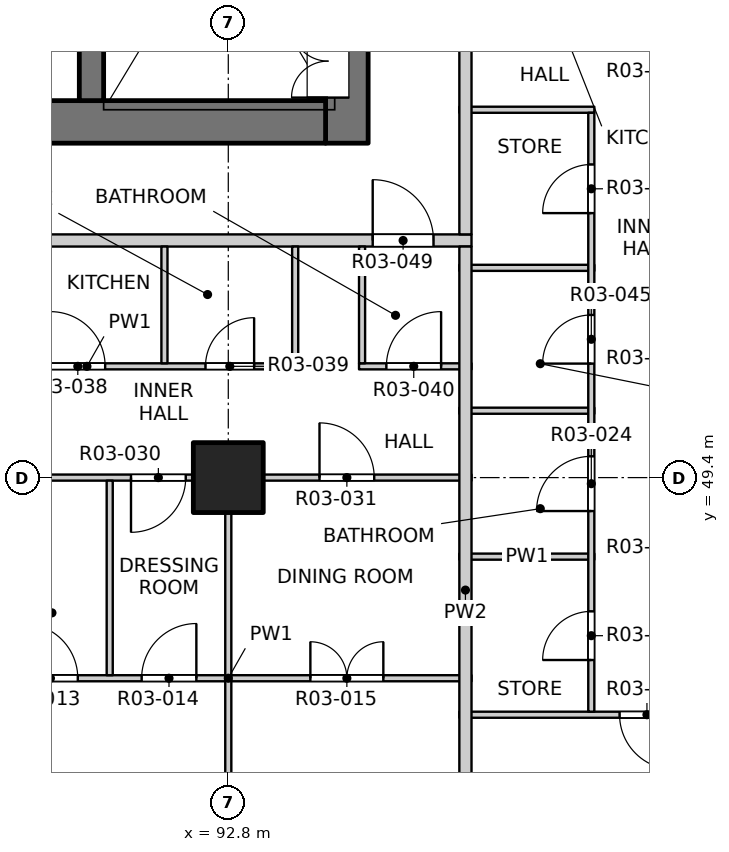
"""IFC4 building model, lengths in metres.
Left out: names, types, materials, properties, quantities, classifications, styles, units other than length and angle.
Written with IfcOpenShell. Run it as: python <this file> out.ifc"""

import sys

from ifc_helpers import new_model, si_unit, direction, frame, frame_2d, origin, origin_2d, place, context, subcontext, project, spatial, rectangle, extrude, element, fill, save


model = new_model("IFC4")
c1 = context("Model", 3, precision=1e-05, world=origin(), true_north=direction((0.0, 1.0)))
c2 = subcontext(c1, "Body", "Model", "MODEL_VIEW")
j1 = project(units=[si_unit("LENGTHUNIT", "METRE"), si_unit("PLANEANGLEUNIT", "RADIAN")], contexts=[c1])
p1 = place(None, origin())
s1 = spatial("IfcSite", under=j1, at=p1, CompositionType="ELEMENT")
p2 = place(p1, origin())
s2 = spatial("IfcBuilding", under=s1, at=p2, CompositionType="ELEMENT")
p3 = place(p2, frame((0.0, 0.0, 39.9)))
s3 = spatial("IfcBuildingStorey", under=s2, at=p3, CompositionType="ELEMENT", Elevation=39.9)
p4 = place(p3, frame((92.8, 49.4, -0.25), z_axis=(0.0, 0.0, 1.0), x_axis=(1.0, 0.0, 0.0)))
e1 = element("IfcColumn", 1, at=p4, inside=s3, PredefinedType="COLUMN", context=c2, shape_type="SweptSolid", body=[
    extrude(rectangle(XDim=1.15, YDim=1.15, at=origin_2d()), origin(), (0.0, 0.0, 1.0), 3.4),
])
p5 = place(p3, frame((94.75, 54.9, -0.25), z_axis=(0.0, 0.0, 1.0), x_axis=(0.0, 1.0, 0.0)))
e2 = element("IfcWall", 2, at=p5, inside=s3, PredefinedType="SOLIDWALL", context=c2, shape_type="SweptSolid", body=[
    extrude(rectangle(XDim=7.05, YDim=0.7, at=frame_2d((3.525, 0.0))), origin(), (0.0, 0.0, 1.0), 3.4),
])
p6 = place(p5, frame((0.75, 0.0, 0.25)))
e3 = element("IfcOpeningElement", 3, at=p6, cuts=e2, PredefinedType="OPENING", context=c2, shape_type="SweptSolid", body=[
    extrude(rectangle(XDim=1.2, YDim=2.1, at=frame_2d((0.6, 1.05))), frame((0.0, 0.36, 0.0), z_axis=(0.0, -1.0, 0.0), x_axis=(1.0, 0.0, 0.0)), (0.0, 0.0, 1.0), 0.72),
])
p7 = place(p3, frame((75.6, 55.25, -0.25), z_axis=(0.0, 0.0, 1.0), x_axis=(1.0, 0.0, 0.0)))
e4 = element("IfcWall", 4, at=p7, inside=s3, PredefinedType="SOLIDWALL", context=c2, shape_type="SweptSolid", body=[
    extrude(rectangle(XDim=18.8, YDim=0.7, at=frame_2d((9.4, 0.0))), origin(), (0.0, 0.0, 1.0), 3.4),
])
p8 = place(p7, frame((8.65, 0.0, 0.25)))
e5 = element("IfcOpeningElement", 5, at=p8, cuts=e4, PredefinedType="OPENING", context=c2, shape_type="SweptSolid", body=[
    extrude(rectangle(XDim=1.5, YDim=2.1, at=frame_2d((0.75, 1.05))), frame((0.0, 0.36, 0.0), z_axis=(0.0, -1.0, 0.0), x_axis=(1.0, 0.0, 0.0)), (0.0, 0.0, 1.0), 0.72),
])
p9 = place(p3, frame((90.55, 55.6, -0.25), z_axis=(0.0, 0.0, 1.0), x_axis=(0.0, 1.0, 0.0)))
e6 = element("IfcWall", 6, at=p9, inside=s3, PredefinedType="SOLIDWALL", context=c2, shape_type="SweptSolid", body=[
    extrude(rectangle(XDim=6.35, YDim=0.4, at=frame_2d((3.175, 0.0))), origin(), (0.0, 0.0, 1.0), 3.4),
])
p10 = place(p3, frame((96.6, 45.5, 0.0), z_axis=(0.0, 0.0, 1.0), x_axis=(1.0, 0.0, 0.0)))
e7 = element("IfcWall", 7, at=p10, inside=s3, PredefinedType="PARTITIONING", context=c2, shape_type="SweptSolid", body=[
    extrude(rectangle(XDim=11.5, YDim=0.1, at=frame_2d((5.75, 0.0))), origin(), (0.0, 0.0, 1.0), 3.15),
])
p11 = place(p10, frame((2.635, 0.0, 0.0)))
e8 = element("IfcOpeningElement", 8, at=p11, cuts=e7, PredefinedType="OPENING", context=c2, shape_type="SweptSolid", body=[
    extrude(rectangle(XDim=0.9, YDim=2.1, at=frame_2d((0.45, 1.05))), frame((0.0, 0.06, 0.0), z_axis=(0.0, -1.0, 0.0), x_axis=(1.0, 0.0, 0.0)), (0.0, 0.0, 1.0), 0.12),
])
p12 = place(p3, frame((88.8, 46.1, 0.0), z_axis=(0.0, 0.0, 1.0), x_axis=(1.0, 0.0, 0.0)))
e9 = element("IfcWall", 9, at=p12, inside=s3, PredefinedType="PARTITIONING", context=c2, shape_type="SweptSolid", body=[
    extrude(rectangle(XDim=8.0, YDim=0.1, at=frame_2d((4.0, 0.0))), origin(), (0.0, 0.0, 1.0), 3.15),
])
p13 = place(p12, frame((0.625, 0.0, 0.0)))
e10 = element("IfcOpeningElement", 10, at=p13, cuts=e9, PredefinedType="OPENING", context=c2, shape_type="SweptSolid", body=[
    extrude(rectangle(XDim=0.9, YDim=2.1, at=frame_2d((0.45, 1.05))), frame((0.0, 0.06, 0.0), z_axis=(0.0, -1.0, 0.0), x_axis=(1.0, 0.0, 0.0)), (0.0, 0.0, 1.0), 0.12),
])
p14 = place(p12, frame((2.575, 0.0, 0.0)))
e11 = element("IfcOpeningElement", 11, at=p14, cuts=e9, PredefinedType="OPENING", context=c2, shape_type="SweptSolid", body=[
    extrude(rectangle(XDim=0.9, YDim=2.1, at=frame_2d((0.45, 1.05))), frame((0.0, 0.06, 0.0), z_axis=(0.0, -1.0, 0.0), x_axis=(1.0, 0.0, 0.0)), (0.0, 0.0, 1.0), 0.12),
])
p15 = place(p12, frame((5.35, 0.0, 0.0)))
e12 = element("IfcOpeningElement", 12, at=p15, cuts=e9, PredefinedType="OPENING", context=c2, shape_type="SweptSolid", body=[
    extrude(rectangle(XDim=1.2, YDim=2.1, at=frame_2d((0.6, 1.05))), frame((0.0, 0.06, 0.0), z_axis=(0.0, -1.0, 0.0), x_axis=(1.0, 0.0, 0.0)), (0.0, 0.0, 1.0), 0.12),
])
p16 = place(p3, frame((96.6, 48.1, 0.0), z_axis=(0.0, 0.0, 1.0), x_axis=(1.0, 0.0, 0.0)))
e13 = element("IfcWall", 13, at=p16, inside=s3, PredefinedType="PARTITIONING", context=c2, shape_type="SweptSolid", body=[
    extrude(rectangle(XDim=2.22, YDim=0.1, at=frame_2d((1.11, 0.0))), origin(), (0.0, 0.0, 1.0), 3.15),
])
p17 = place(p3, frame((73.2, 49.4, 0.0), z_axis=(0.0, 0.0, 1.0), x_axis=(1.0, 0.0, 0.0)))
e14 = element("IfcWall", 14, at=p17, inside=s3, PredefinedType="PARTITIONING", context=c2, shape_type="SweptSolid", body=[
    extrude(rectangle(XDim=23.6, YDim=0.1, at=frame_2d((11.8, 0.0))), origin(), (0.0, 0.0, 1.0), 3.15),
])
p18 = place(p17, frame((1.6, 0.0, 0.0)))
e15 = element("IfcOpeningElement", 15, at=p18, cuts=e14, PredefinedType="OPENING", context=c2, shape_type="SweptSolid", body=[
    extrude(rectangle(XDim=0.9, YDim=2.1, at=frame_2d((0.45, 1.05))), frame((0.0, 0.06, 0.0), z_axis=(0.0, -1.0, 0.0), x_axis=(1.0, 0.0, 0.0)), (0.0, 0.0, 1.0), 0.12),
])
p19 = place(p17, frame((6.475, 0.0, 0.0)))
e16 = element("IfcOpeningElement", 16, at=p19, cuts=e14, PredefinedType="OPENING", context=c2, shape_type="SweptSolid", body=[
    extrude(rectangle(XDim=0.9, YDim=2.1, at=frame_2d((0.45, 1.05))), frame((0.0, 0.06, 0.0), z_axis=(0.0, -1.0, 0.0), x_axis=(1.0, 0.0, 0.0)), (0.0, 0.0, 1.0), 0.12),
])
p20 = place(p17, frame((9.4, 0.0, 0.0)))
e17 = element("IfcOpeningElement", 17, at=p20, cuts=e14, PredefinedType="OPENING", context=c2, shape_type="SweptSolid", body=[
    extrude(rectangle(XDim=0.9, YDim=2.1, at=frame_2d((0.45, 1.05))), frame((0.0, 0.06, 0.0), z_axis=(0.0, -1.0, 0.0), x_axis=(1.0, 0.0, 0.0)), (0.0, 0.0, 1.0), 0.12),
])
p21 = place(p17, frame((14.275, 0.0, 0.0)))
e18 = element("IfcOpeningElement", 18, at=p21, cuts=e14, PredefinedType="OPENING", context=c2, shape_type="SweptSolid", body=[
    extrude(rectangle(XDim=0.9, YDim=2.1, at=frame_2d((0.45, 1.05))), frame((0.0, 0.06, 0.0), z_axis=(0.0, -1.0, 0.0), x_axis=(1.0, 0.0, 0.0)), (0.0, 0.0, 1.0), 0.12),
])
p22 = place(p17, frame((18.0, 0.0, 0.0)))
e19 = element("IfcOpeningElement", 19, at=p22, cuts=e14, PredefinedType="OPENING", context=c2, shape_type="SweptSolid", body=[
    extrude(rectangle(XDim=0.9, YDim=2.1, at=frame_2d((0.45, 1.05))), frame((0.0, 0.06, 0.0), z_axis=(0.0, -1.0, 0.0), x_axis=(1.0, 0.0, 0.0)), (0.0, 0.0, 1.0), 0.12),
])
p23 = place(p17, frame((21.1, 0.0, 0.0)))
e20 = element("IfcOpeningElement", 20, at=p23, cuts=e14, PredefinedType="OPENING", context=c2, shape_type="SweptSolid", body=[
    extrude(rectangle(XDim=0.9, YDim=2.1, at=frame_2d((0.45, 1.05))), frame((0.0, 0.06, 0.0), z_axis=(0.0, -1.0, 0.0), x_axis=(1.0, 0.0, 0.0)), (0.0, 0.0, 1.0), 0.12),
])
p24 = place(p3, frame((96.6, 50.5, 0.0), z_axis=(0.0, 0.0, 1.0), x_axis=(1.0, 0.0, 0.0)))
e21 = element("IfcWall", 21, at=p24, inside=s3, PredefinedType="PARTITIONING", context=c2, shape_type="SweptSolid", body=[
    extrude(rectangle(XDim=2.22, YDim=0.1, at=frame_2d((1.11, 0.0))), origin(), (0.0, 0.0, 1.0), 3.15),
])
p25 = place(p3, frame((87.0, 51.23, 0.0), z_axis=(0.0, 0.0, 1.0), x_axis=(1.0, 0.0, 0.0)))
e22 = element("IfcWall", 22, at=p25, inside=s3, PredefinedType="PARTITIONING", context=c2, shape_type="SweptSolid", body=[
    extrude(rectangle(XDim=6.95, YDim=0.1, at=frame_2d((3.475, 0.0))), origin(), (0.0, 0.0, 1.0), 3.15),
])
p26 = place(p25, frame((0.525, 0.0, 0.0)))
e23 = element("IfcOpeningElement", 23, at=p26, cuts=e22, PredefinedType="OPENING", context=c2, shape_type="SweptSolid", body=[
    extrude(rectangle(XDim=0.9, YDim=2.1, at=frame_2d((0.45, 1.05))), frame((0.0, 0.06, 0.0), z_axis=(0.0, -1.0, 0.0), x_axis=(1.0, 0.0, 0.0)), (0.0, 0.0, 1.0), 0.12),
])
p27 = place(p25, frame((2.875, 0.0, 0.0)))
e24 = element("IfcOpeningElement", 24, at=p27, cuts=e22, PredefinedType="OPENING", context=c2, shape_type="SweptSolid", body=[
    extrude(rectangle(XDim=0.9, YDim=2.1, at=frame_2d((0.45, 1.05))), frame((0.0, 0.06, 0.0), z_axis=(0.0, -1.0, 0.0), x_axis=(1.0, 0.0, 0.0)), (0.0, 0.0, 1.0), 0.12),
])
p28 = place(p25, frame((5.425, 0.0, 0.0)))
e25 = element("IfcOpeningElement", 25, at=p28, cuts=e22, PredefinedType="OPENING", context=c2, shape_type="SweptSolid", body=[
    extrude(rectangle(XDim=0.8, YDim=2.1, at=frame_2d((0.4, 1.05))), frame((0.0, 0.06, 0.0), z_axis=(0.0, -1.0, 0.0), x_axis=(1.0, 0.0, 0.0)), (0.0, 0.0, 1.0), 0.12),
])
p29 = place(p3, frame((94.95, 51.23, 0.0), z_axis=(0.0, 0.0, 1.0), x_axis=(1.0, 0.0, 0.0)))
e26 = element("IfcWall", 26, at=p29, inside=s3, PredefinedType="PARTITIONING", context=c2, shape_type="SweptSolid", body=[
    extrude(rectangle(XDim=1.85, YDim=0.1, at=frame_2d((0.925, 0.0))), origin(), (0.0, 0.0, 1.0), 3.15),
])
p30 = place(p29, frame((0.45, 0.0, 0.0)))
e27 = element("IfcOpeningElement", 27, at=p30, cuts=e26, PredefinedType="OPENING", context=c2, shape_type="SweptSolid", body=[
    extrude(rectangle(XDim=0.9, YDim=2.1, at=frame_2d((0.45, 1.05))), frame((0.0, 0.06, 0.0), z_axis=(0.0, -1.0, 0.0), x_axis=(1.0, 0.0, 0.0)), (0.0, 0.0, 1.0), 0.12),
])
p31 = place(p3, frame((96.6, 52.85, 0.0), z_axis=(0.0, 0.0, 1.0), x_axis=(1.0, 0.0, 0.0)))
e28 = element("IfcWall", 28, at=p31, inside=s3, PredefinedType="PARTITIONING", context=c2, shape_type="SweptSolid", body=[
    extrude(rectangle(XDim=2.22, YDim=0.1, at=frame_2d((1.11, 0.0))), origin(), (0.0, 0.0, 1.0), 3.15),
])
p32 = place(p3, frame((73.2, 53.3, 0.0), z_axis=(0.0, 0.0, 1.0), x_axis=(1.0, 0.0, 0.0)))
e29 = element("IfcWall", 29, at=p32, inside=s3, PredefinedType="PARTITIONING", context=c2, shape_type="SweptSolid", body=[
    extrude(rectangle(XDim=23.6, YDim=0.2, at=frame_2d((11.8, 0.0))), origin(), (0.0, 0.0, 1.0), 3.15),
])
p33 = place(p32, frame((2.825, 0.0, 0.0)))
e30 = element("IfcOpeningElement", 30, at=p33, cuts=e29, PredefinedType="OPENING", context=c2, shape_type="SweptSolid", body=[
    extrude(rectangle(XDim=1.0, YDim=2.1, at=frame_2d((0.5, 1.05))), frame((0.0, 0.11, 0.0), z_axis=(0.0, -1.0, 0.0), x_axis=(1.0, 0.0, 0.0)), (0.0, 0.0, 1.0), 0.22),
])
p34 = place(p32, frame((14.025, 0.0, 0.0)))
e31 = element("IfcOpeningElement", 31, at=p34, cuts=e29, PredefinedType="OPENING", context=c2, shape_type="SweptSolid", body=[
    extrude(rectangle(XDim=1.0, YDim=2.1, at=frame_2d((0.5, 1.05))), frame((0.0, 0.11, 0.0), z_axis=(0.0, -1.0, 0.0), x_axis=(1.0, 0.0, 0.0)), (0.0, 0.0, 1.0), 0.22),
])
p35 = place(p32, frame((21.975, 0.0, 0.0)))
e32 = element("IfcOpeningElement", 32, at=p35, cuts=e29, PredefinedType="OPENING", context=c2, shape_type="SweptSolid", body=[
    extrude(rectangle(XDim=1.0, YDim=2.1, at=frame_2d((0.5, 1.05))), frame((0.0, 0.11, 0.0), z_axis=(0.0, -1.0, 0.0), x_axis=(1.0, 0.0, 0.0)), (0.0, 0.0, 1.0), 0.22),
])
p36 = place(p3, frame((96.6, 55.45, 0.0), z_axis=(0.0, 0.0, 1.0), x_axis=(1.0, 0.0, 0.0)))
e33 = element("IfcWall", 33, at=p36, inside=s3, PredefinedType="PARTITIONING", context=c2, shape_type="SweptSolid", body=[
    extrude(rectangle(XDim=2.22, YDim=0.1, at=frame_2d((1.11, 0.0))), origin(), (0.0, 0.0, 1.0), 3.15),
])
p37 = place(p3, frame((90.85, 46.15, 0.0), z_axis=(0.0, 0.0, 1.0), x_axis=(0.0, 1.0, 0.0)))
e34 = element("IfcWall", 34, at=p37, inside=s3, PredefinedType="PARTITIONING", context=c2, shape_type="SweptSolid", body=[
    extrude(rectangle(XDim=3.2, YDim=0.1, at=frame_2d((1.6, 0.0))), origin(), (0.0, 0.0, 1.0), 3.15),
])
p38 = place(p3, frame((91.75, 51.28, 0.0), z_axis=(0.0, 0.0, 1.0), x_axis=(0.0, 1.0, 0.0)))
e35 = element("IfcWall", 35, at=p38, inside=s3, PredefinedType="PARTITIONING", context=c2, shape_type="SweptSolid", body=[
    extrude(rectangle(XDim=1.92, YDim=0.1, at=frame_2d((0.96, 0.0))), origin(), (0.0, 0.0, 1.0), 3.15),
])
p39 = place(p3, frame((92.8, 41.9, 0.0), z_axis=(0.0, 0.0, 1.0), x_axis=(0.0, 1.0, 0.0)))
e36 = element("IfcWall", 36, at=p39, inside=s3, PredefinedType="PARTITIONING", context=c2, shape_type="SweptSolid", body=[
    extrude(rectangle(XDim=7.45, YDim=0.1, at=frame_2d((3.725, 0.0))), origin(), (0.0, 0.0, 1.0), 2.55),
])
for number, where, z_axis, x_axis in (
    (37, (93.9, 51.28, 0.0), (0.0, 0.0, 1.0), (0.0, 1.0, 0.0)),
    (38, (95.0, 51.28, 0.0), (0.0, 0.0, 1.0), (0.0, 1.0, 0.0)),
):
    element("IfcWall", number, at=place(p3, frame(where, z_axis=z_axis, x_axis=x_axis)), inside=s3, PredefinedType="PARTITIONING", context=c2, shape_type="SweptSolid", body=[
        extrude(rectangle(XDim=1.92, YDim=0.1, at=frame_2d((0.96, 0.0))), origin(), (0.0, 0.0, 1.0), 3.15),
    ])
p40 = place(p3, frame((96.7, 41.9, 0.0), z_axis=(0.0, 0.0, 1.0), x_axis=(0.0, 1.0, 0.0)))
e39 = element("IfcWall", 39, at=p40, inside=s3, PredefinedType="PARTITIONING", context=c2, shape_type="SweptSolid", body=[
    extrude(rectangle(XDim=11.3, YDim=0.2, at=frame_2d((5.65, 0.0))), origin(), (0.0, 0.0, 1.0), 3.15),
])
p41 = place(p3, frame((96.7, 53.4, 0.0), z_axis=(0.0, 0.0, 1.0), x_axis=(0.0, 1.0, 0.0)))
e40 = element("IfcWall", 40, at=p41, inside=s3, PredefinedType="PARTITIONING", context=c2, shape_type="SweptSolid", body=[
    extrude(rectangle(XDim=31.0, YDim=0.2, at=frame_2d((15.5, 0.0))), origin(), (0.0, 0.0, 1.0), 3.15),
])
p42 = place(p41, frame((3.325, 0.0, 0.0)))
e41 = element("IfcOpeningElement", 41, at=p42, cuts=e40, PredefinedType="OPENING", context=c2, shape_type="SweptSolid", body=[
    extrude(rectangle(XDim=1.0, YDim=2.1, at=frame_2d((0.5, 1.05))), frame((0.0, 0.11, 0.0), z_axis=(0.0, -1.0, 0.0), x_axis=(1.0, 0.0, 0.0)), (0.0, 0.0, 1.0), 0.22),
])
p43 = place(p41, frame((11.125, 0.0, 0.0)))
e42 = element("IfcOpeningElement", 42, at=p43, cuts=e40, PredefinedType="OPENING", context=c2, shape_type="SweptSolid", body=[
    extrude(rectangle(XDim=1.0, YDim=2.1, at=frame_2d((0.5, 1.05))), frame((0.0, 0.11, 0.0), z_axis=(0.0, -1.0, 0.0), x_axis=(1.0, 0.0, 0.0)), (0.0, 0.0, 1.0), 0.22),
])
p44 = place(p41, frame((26.875, 0.0, 0.0)))
e43 = element("IfcOpeningElement", 43, at=p44, cuts=e40, PredefinedType="OPENING", context=c2, shape_type="SweptSolid", body=[
    extrude(rectangle(XDim=1.0, YDim=2.1, at=frame_2d((0.5, 1.05))), frame((0.0, 0.11, 0.0), z_axis=(0.0, -1.0, 0.0), x_axis=(1.0, 0.0, 0.0)), (0.0, 0.0, 1.0), 0.22),
])
p45 = place(p3, frame((98.77, 45.55, 0.0), z_axis=(0.0, 0.0, 1.0), x_axis=(0.0, 1.0, 0.0)))
e44 = element("IfcWall", 44, at=p45, inside=s3, PredefinedType="PARTITIONING", context=c2, shape_type="SweptSolid", body=[
    extrude(rectangle(XDim=9.85, YDim=0.1, at=frame_2d((4.925, 0.0))), origin(), (0.0, 0.0, 1.0), 3.15),
])
p46 = place(p45, frame((0.85, 0.0, 0.0)))
e45 = element("IfcOpeningElement", 45, at=p46, cuts=e44, PredefinedType="OPENING", context=c2, shape_type="SweptSolid", body=[
    extrude(rectangle(XDim=0.8, YDim=2.1, at=frame_2d((0.4, 1.05))), frame((0.0, 0.06, 0.0), z_axis=(0.0, -1.0, 0.0), x_axis=(1.0, 0.0, 0.0)), (0.0, 0.0, 1.0), 0.12),
])
p47 = place(p45, frame((3.3, 0.0, 0.0)))
e46 = element("IfcOpeningElement", 46, at=p47, cuts=e44, PredefinedType="OPENING", context=c2, shape_type="SweptSolid", body=[
    extrude(rectangle(XDim=0.9, YDim=2.1, at=frame_2d((0.45, 1.05))), frame((0.0, 0.06, 0.0), z_axis=(0.0, -1.0, 0.0), x_axis=(1.0, 0.0, 0.0)), (0.0, 0.0, 1.0), 0.12),
])
p48 = place(p45, frame((5.725, 0.0, 0.0)))
e47 = element("IfcOpeningElement", 47, at=p48, cuts=e44, PredefinedType="OPENING", context=c2, shape_type="SweptSolid", body=[
    extrude(rectangle(XDim=0.8, YDim=2.1, at=frame_2d((0.4, 1.05))), frame((0.0, 0.06, 0.0), z_axis=(0.0, -1.0, 0.0), x_axis=(1.0, 0.0, 0.0)), (0.0, 0.0, 1.0), 0.12),
])
p49 = place(p45, frame((8.2, 0.0, 0.0)))
e48 = element("IfcOpeningElement", 48, at=p49, cuts=e44, PredefinedType="OPENING", context=c2, shape_type="SweptSolid", body=[
    extrude(rectangle(XDim=0.8, YDim=2.1, at=frame_2d((0.4, 1.05))), frame((0.0, 0.06, 0.0), z_axis=(0.0, -1.0, 0.0), x_axis=(1.0, 0.0, 0.0)), (0.0, 0.0, 1.0), 0.12),
])
p50 = place(p11, origin())
e49 = element("IfcDoor", 49, at=p50, inside=s3, OperationType="SINGLE_SWING_LEFT", PredefinedType="DOOR", context=c2, shape_type="SweptSolid", body=[
    extrude(rectangle(XDim=0.9, YDim=2.1, at=frame_2d((0.45, 1.05))), frame((0.0, 0.025, 0.0), z_axis=(0.0, -1.0, 0.0), x_axis=(1.0, 0.0, 0.0)), (0.0, 0.0, 1.0), 0.05),
])
fill(e8, e49)
p51 = place(p13, origin())
e50 = element("IfcDoor", 50, at=p51, inside=s3, OperationType="SINGLE_SWING_LEFT", PredefinedType="DOOR", context=c2, shape_type="SweptSolid", body=[
    extrude(rectangle(XDim=0.9, YDim=2.1, at=frame_2d((0.45, 1.05))), frame((0.0, 0.025, 0.0), z_axis=(0.0, -1.0, 0.0), x_axis=(1.0, 0.0, 0.0)), (0.0, 0.0, 1.0), 0.05),
])
fill(e10, e50)
p52 = place(p14, origin())
e51 = element("IfcDoor", 51, at=p52, inside=s3, OperationType="SINGLE_SWING_RIGHT", PredefinedType="DOOR", context=c2, shape_type="SweptSolid", body=[
    extrude(rectangle(XDim=0.9, YDim=2.1, at=frame_2d((0.45, 1.05))), frame((0.0, 0.025, 0.0), z_axis=(0.0, -1.0, 0.0), x_axis=(1.0, 0.0, 0.0)), (0.0, 0.0, 1.0), 0.05),
])
fill(e11, e51)
p53 = place(p15, origin())
e52 = element("IfcDoor", 52, at=p53, inside=s3, OperationType="DOUBLE_DOOR_SINGLE_SWING", PredefinedType="DOOR", context=c2, shape_type="SweptSolid", body=[
    extrude(rectangle(XDim=1.2, YDim=2.1, at=frame_2d((0.6, 1.05))), frame((0.0, 0.025, 0.0), z_axis=(0.0, -1.0, 0.0), x_axis=(1.0, 0.0, 0.0)), (0.0, 0.0, 1.0), 0.05),
])
fill(e12, e52)
p54 = place(p46, origin())
e53 = element("IfcDoor", 53, at=p54, inside=s3, OperationType="SINGLE_SWING_LEFT", PredefinedType="DOOR", context=c2, shape_type="SweptSolid", body=[
    extrude(rectangle(XDim=0.8, YDim=2.1, at=frame_2d((0.4, 1.05))), frame((0.0, 0.025, 0.0), z_axis=(0.0, -1.0, 0.0), x_axis=(1.0, 0.0, 0.0)), (0.0, 0.0, 1.0), 0.05),
])
fill(e45, e53)
p55 = place(p47, origin())
e54 = element("IfcDoor", 54, at=p55, inside=s3, OperationType="SINGLE_SWING_LEFT", PredefinedType="DOOR", context=c2, shape_type="SweptSolid", body=[
    extrude(rectangle(XDim=0.9, YDim=2.1, at=frame_2d((0.45, 1.05))), frame((0.0, 0.025, 0.0), z_axis=(0.0, -1.0, 0.0), x_axis=(1.0, 0.0, 0.0)), (0.0, 0.0, 1.0), 0.05),
])
fill(e46, e54)
p56 = place(p22, origin())
e55 = element("IfcDoor", 55, at=p56, inside=s3, OperationType="SINGLE_SWING_RIGHT", PredefinedType="DOOR", context=c2, shape_type="SweptSolid", body=[
    extrude(rectangle(XDim=0.9, YDim=2.1, at=frame_2d((0.45, 1.05))), frame((0.0, 0.025, 0.0), z_axis=(0.0, -1.0, 0.0), x_axis=(1.0, 0.0, 0.0)), (0.0, 0.0, 1.0), 0.05),
])
fill(e19, e55)
p57 = place(p23, origin())
e56 = element("IfcDoor", 56, at=p57, inside=s3, OperationType="SINGLE_SWING_LEFT", PredefinedType="DOOR", context=c2, shape_type="SweptSolid", body=[
    extrude(rectangle(XDim=0.9, YDim=2.1, at=frame_2d((0.45, 1.05))), frame((0.0, 0.025, 0.0), z_axis=(0.0, -1.0, 0.0), x_axis=(1.0, 0.0, 0.0)), (0.0, 0.0, 1.0), 0.05),
])
fill(e20, e56)
p58 = place(p27, origin())
e57 = element("IfcDoor", 57, at=p58, inside=s3, OperationType="SINGLE_SWING_LEFT", PredefinedType="DOOR", context=c2, shape_type="SweptSolid", body=[
    extrude(rectangle(XDim=0.9, YDim=2.1, at=frame_2d((0.45, 1.05))), frame((0.0, 0.025, 0.0), z_axis=(0.0, -1.0, 0.0), x_axis=(1.0, 0.0, 0.0)), (0.0, 0.0, 1.0), 0.05),
])
fill(e24, e57)
p59 = place(p28, origin())
e58 = element("IfcDoor", 58, at=p59, inside=s3, OperationType="SINGLE_SWING_RIGHT", PredefinedType="DOOR", context=c2, shape_type="SweptSolid", body=[
    extrude(rectangle(XDim=0.8, YDim=2.1, at=frame_2d((0.4, 1.05))), frame((0.0, 0.025, 0.0), z_axis=(0.0, -1.0, 0.0), x_axis=(1.0, 0.0, 0.0)), (0.0, 0.0, 1.0), 0.05),
])
fill(e25, e58)
p60 = place(p30, origin())
e59 = element("IfcDoor", 59, at=p60, inside=s3, OperationType="SINGLE_SWING_RIGHT", PredefinedType="DOOR", context=c2, shape_type="SweptSolid", body=[
    extrude(rectangle(XDim=0.9, YDim=2.1, at=frame_2d((0.45, 1.05))), frame((0.0, 0.025, 0.0), z_axis=(0.0, -1.0, 0.0), x_axis=(1.0, 0.0, 0.0)), (0.0, 0.0, 1.0), 0.05),
])
fill(e27, e59)
p61 = place(p48, origin())
e60 = element("IfcDoor", 60, at=p61, inside=s3, OperationType="SINGLE_SWING_LEFT", PredefinedType="DOOR", context=c2, shape_type="SweptSolid", body=[
    extrude(rectangle(XDim=0.8, YDim=2.1, at=frame_2d((0.4, 1.05))), frame((0.0, 0.025, 0.0), z_axis=(0.0, -1.0, 0.0), x_axis=(1.0, 0.0, 0.0)), (0.0, 0.0, 1.0), 0.05),
])
fill(e47, e60)
p62 = place(p35, origin())
e61 = element("IfcDoor", 61, at=p62, inside=s3, OperationType="SINGLE_SWING_LEFT", PredefinedType="DOOR", context=c2, shape_type="SweptSolid", body=[
    extrude(rectangle(XDim=1.0, YDim=2.1, at=frame_2d((0.5, 1.05))), frame((0.0, 0.025, 0.0), z_axis=(0.0, -1.0, 0.0), x_axis=(1.0, 0.0, 0.0)), (0.0, 0.0, 1.0), 0.05),
])
fill(e32, e61)
p63 = place(p49, origin())
e62 = element("IfcDoor", 62, at=p63, inside=s3, OperationType="SINGLE_SWING_LEFT", PredefinedType="DOOR", context=c2, shape_type="SweptSolid", body=[
    extrude(rectangle(XDim=0.8, YDim=2.1, at=frame_2d((0.4, 1.05))), frame((0.0, 0.025, 0.0), z_axis=(0.0, -1.0, 0.0), x_axis=(1.0, 0.0, 0.0)), (0.0, 0.0, 1.0), 0.05),
])
fill(e48, e62)
p64 = place(p6, origin())
e63 = element("IfcDoor", 63, at=p64, inside=s3, OperationType="DOUBLE_DOOR_SINGLE_SWING", PredefinedType="DOOR", context=c2, shape_type="SweptSolid", body=[
    extrude(rectangle(XDim=1.2, YDim=2.1, at=frame_2d((0.6, 1.05))), frame((0.0, 0.335, 0.0), z_axis=(0.0, -1.0, 0.0), x_axis=(1.0, 0.0, 0.0)), (0.0, 0.0, 1.0), 0.05),
])
fill(e3, e63)
save(model, sys.argv[1])
